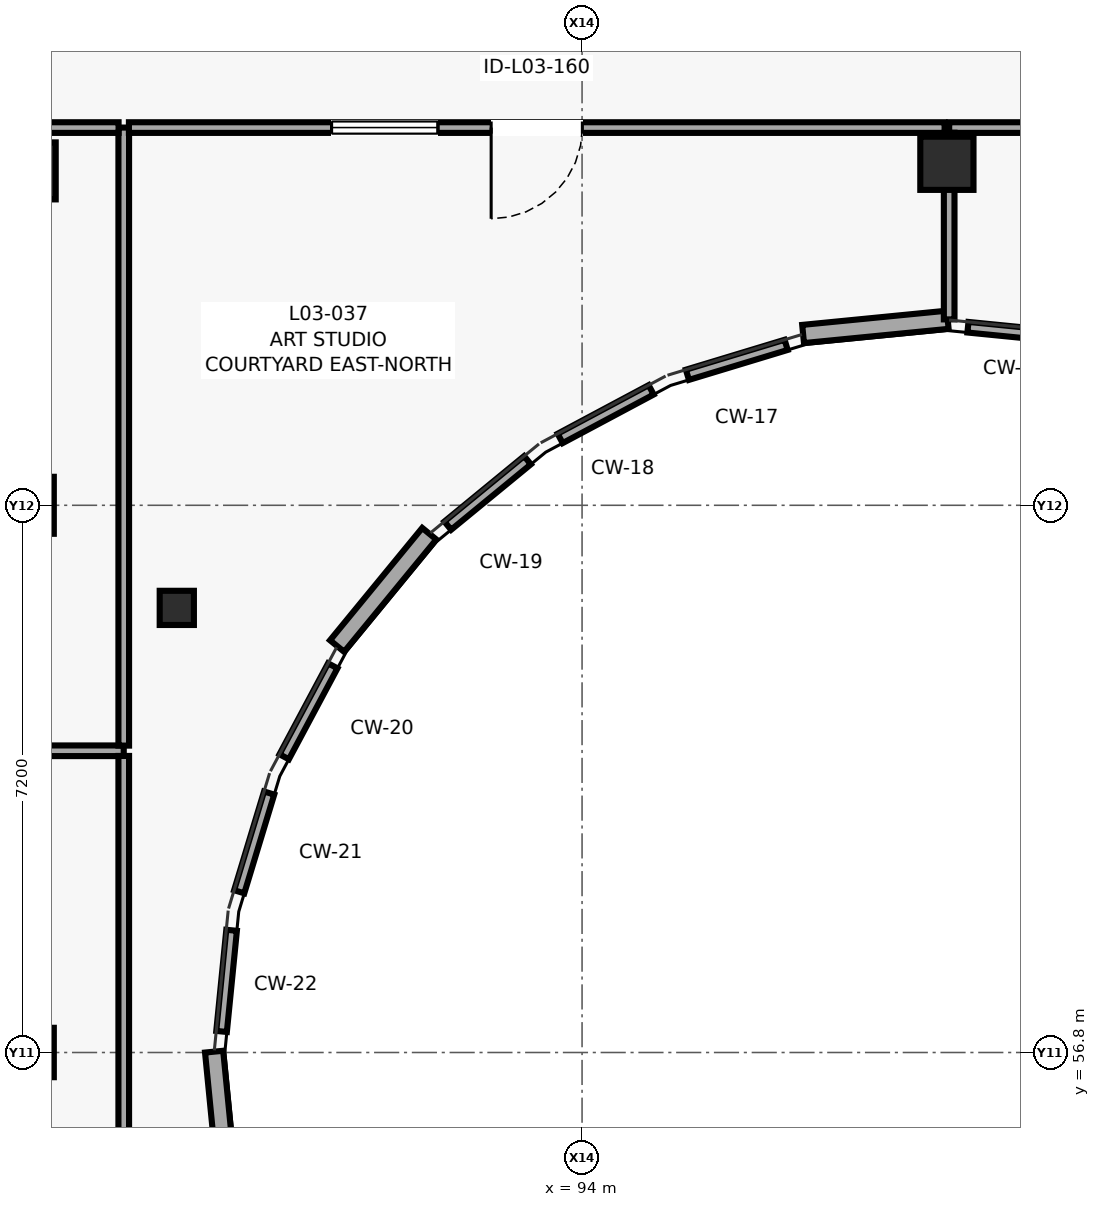
"""IFC4 building model, lengths in metres.
Left out: names, types, materials, properties, quantities, classifications, styles, units other than length and angle.
Written with IfcOpenShell. Run it as: python <this file> out.ifc"""

import sys

from ifc_helpers import new_model, si_unit, direction, frame, frame_2d, origin, origin_2d, place, context, subcontext, project, spatial, rectangle, circle, extrude, element, fill, save


model = new_model("IFC4")
c1 = context("Model", 3, precision=1e-05, world=origin(), true_north=direction((0.0, 1.0)))
c2 = subcontext(c1, "Body", "Model", "MODEL_VIEW")
j1 = project(units=[si_unit("LENGTHUNIT", "METRE"), si_unit("PLANEANGLEUNIT", "RADIAN")], contexts=[c1])
p1 = place(None, origin())
s1 = spatial("IfcSite", under=j1, at=p1, CompositionType="ELEMENT")
p2 = place(p1, origin())
s2 = spatial("IfcBuilding", under=s1, at=p2, CompositionType="ELEMENT")
p3 = place(p2, frame((0.0, 0.0, 12.2)))
s3 = spatial("IfcBuildingStorey", under=s2, at=p3, CompositionType="ELEMENT", Elevation=12.2)
p4 = place(p3, frame((86.8, 56.8, 0.0), z_axis=(0.0, 0.0, 1.0), x_axis=(1.0, 0.0, 0.0)))
e1 = element("IfcColumn", 1, at=p4, inside=s3, PredefinedType="COLUMN", context=c2, shape_type="SweptSolid", body=[
    extrude(rectangle(XDim=0.5, YDim=0.65, at=origin_2d()), origin(), (0.0, 0.0, 1.0), 4.0),
])
p5 = place(p3, frame((86.8, 64.0, 0.0), z_axis=(0.0, 0.0, 1.0), x_axis=(1.0, 0.0, 0.0)))
e2 = element("IfcColumn", 2, at=p5, inside=s3, PredefinedType="COLUMN", context=c2, shape_type="SweptSolid", body=[
    extrude(rectangle(XDim=0.5, YDim=0.75, at=origin_2d()), origin(), (0.0, 0.0, 1.0), 4.0),
])
p6 = place(p3, frame((86.8, 68.4, 0.0), z_axis=(0.0, 0.0, 1.0), x_axis=(1.0, 0.0, 0.0)))
e3 = element("IfcColumn", 3, at=p6, inside=s3, PredefinedType="COLUMN", context=c2, shape_type="SweptSolid", body=[
    extrude(rectangle(XDim=0.55, YDim=0.75, at=origin_2d()), origin(), (0.0, 0.0, 1.0), 4.0),
])
p7 = place(p3, frame((88.668, 62.65, 0.0), z_axis=(0.0, 0.0, 1.0), x_axis=(1.0, 0.0, 0.0)))
e4 = element("IfcColumn", 4, at=p7, inside=s3, PredefinedType="COLUMN", context=c2, shape_type="SweptSolid", body=[
    extrude(circle(Radius=0.225, at=origin_2d()), origin(), (0.0, 0.0, 1.0), 4.0),
])
p8 = place(p3, frame((98.8, 68.5, 0.0), z_axis=(0.0, 0.0, 1.0), x_axis=(1.0, 0.0, 0.0)))
e5 = element("IfcColumn", 5, at=p8, inside=s3, PredefinedType="COLUMN", context=c2, shape_type="SweptSolid", body=[
    extrude(circle(Radius=0.35, at=origin_2d()), origin(), (0.0, 0.0, 1.0), 4.0),
])
p9 = place(p3, frame((98.811, 66.441, 0.0), z_axis=(0.0, 0.0, 1.0), x_axis=(-0.995206378086, -0.097797060374, 0.0)))
e6 = element("IfcWall", 6, at=p9, inside=s3, PredefinedType="SOLIDWALL", context=c2, shape_type="SweptSolid", body=[
    extrude(rectangle(XDim=1.912, YDim=0.24, at=frame_2d((0.956, 0.0))), origin(), (0.0, 0.0, 1.0), 3.78),
])
p10 = place(p3, frame((91.99, 63.626, 0.0), z_axis=(0.0, 0.0, 1.0), x_axis=(-0.634363572305, -0.773034836299, 0.0)))
e7 = element("IfcWall", 7, at=p10, inside=s3, PredefinedType="SOLIDWALL", context=c2, shape_type="SweptSolid", body=[
    extrude(rectangle(XDim=1.912, YDim=0.24, at=frame_2d((0.956, 0.0))), origin(), (0.0, 0.0, 1.0), 3.78),
])
p11 = place(p3, frame((89.159, 56.811, 0.0), z_axis=(0.0, 0.0, 1.0), x_axis=(0.097797060374, -0.995206378086, 0.0)))
e8 = element("IfcWall", 8, at=p11, inside=s3, PredefinedType="SOLIDWALL", context=c2, shape_type="SweptSolid", body=[
    extrude(rectangle(XDim=1.912, YDim=0.24, at=frame_2d((0.956, 0.0))), origin(), (0.0, 0.0, 1.0), 3.78),
])
p12 = place(p3, frame((87.97, 60.77, 0.0), z_axis=(0.0, 0.0, 1.0), x_axis=(-1.0, 0.0, 0.0)))
e9 = element("IfcWall", 9, at=p12, inside=s3, PredefinedType="PARTITIONING", context=c2, shape_type="SweptSolid", body=[
    extrude(rectangle(XDim=8.44, YDim=0.14, at=frame_2d((4.22, 0.0))), origin(), (0.0, 0.0, 1.0), 3.755),
])
p13 = place(p3, frame((87.97, 52.83, 0.0), z_axis=(0.0, 0.0, 1.0), x_axis=(0.0, 1.0, 0.0)))
e10 = element("IfcWall", 10, at=p13, inside=s3, PredefinedType="PARTITIONING", context=c2, shape_type="SweptSolid", body=[
    extrude(rectangle(XDim=7.872, YDim=0.14, at=frame_2d((3.936, 0.0))), origin(), (0.0, 0.0, 1.0), 3.755),
])
p14 = place(p3, frame((87.97, 60.838, 0.0), z_axis=(0.0, 0.0, 1.0), x_axis=(0.0, 1.0, 0.0)))
e11 = element("IfcWall", 11, at=p14, inside=s3, PredefinedType="PARTITIONING", context=c2, shape_type="SweptSolid", body=[
    extrude(rectangle(XDim=8.132, YDim=0.14, at=frame_2d((4.066, 0.0))), origin(), (0.0, 0.0, 1.0), 3.755),
])
p15 = place(p3, frame((87.902, 68.97, 0.0), z_axis=(0.0, 0.0, 1.0), x_axis=(-1.0, 0.0, 0.0)))
e12 = element("IfcWall", 12, at=p15, inside=s3, PredefinedType="PARTITIONING", context=c2, shape_type="SweptSolid", body=[
    extrude(rectangle(XDim=8.372, YDim=0.14, at=frame_2d((4.186, 0.0))), origin(), (0.0, 0.0, 1.0), 3.755),
])
p16 = place(p3, frame((112.902, 68.97, 0.0), z_axis=(0.0, 0.0, 1.0), x_axis=(-1.0, 0.0, 0.0)))
e13 = element("IfcWall", 13, at=p16, inside=s3, PredefinedType="PARTITIONING", context=c2, shape_type="SweptSolid", body=[
    extrude(rectangle(XDim=14.072, YDim=0.14, at=frame_2d((7.036, 0.0))), origin(), (0.0, 0.0, 1.0), 3.755),
])
p17 = place(p16, frame((6.436, 0.0, 0.0)))
e14 = element("IfcOpeningElement", 14, at=p17, cuts=e13, PredefinedType="OPENING", context=c2, shape_type="SweptSolid", body=[
    extrude(rectangle(XDim=1.2, YDim=2.15, at=frame_2d((0.6, 1.075))), frame((0.0, 0.08, 0.0), z_axis=(0.0, -1.0, 0.0), x_axis=(1.0, 0.0, 0.0)), (0.0, 0.0, 1.0), 0.16),
])
p18 = place(p16, frame((8.336, 0.0, 1.05)))
e15 = element("IfcOpeningElement", 15, at=p18, cuts=e13, PredefinedType="OPENING", context=c2, shape_type="SweptSolid", body=[
    extrude(rectangle(XDim=1.6, YDim=1.1, at=frame_2d((0.8, 0.55))), frame((0.0, 0.08, 0.0), z_axis=(0.0, -1.0, 0.0), x_axis=(1.0, 0.0, 0.0)), (0.0, 0.0, 1.0), 0.16),
])
p19 = place(p3, frame((98.83, 68.902, 0.0), z_axis=(0.0, 0.0, 1.0), x_axis=(0.0, -1.0, 0.0)))
e16 = element("IfcWall", 16, at=p19, inside=s3, PredefinedType="PARTITIONING", context=c2, shape_type="SweptSolid", body=[
    extrude(rectangle(XDim=2.456, YDim=0.14, at=frame_2d((1.228, 0.0))), origin(), (0.0, 0.0, 1.0), 3.755),
])
p20 = place(p3, frame((99.077, 66.343, 0.0), z_axis=(0.0, 0.0, 1.0), x_axis=(0.995112801185, -0.098744685517, 0.0)))
e17 = element("IfcWall", 17, at=p20, inside=s3, PredefinedType="PARTITIONING", context=c2, shape_type="SweptSolid", body=[
    extrude(rectangle(XDim=1.338, YDim=0.14, at=frame_2d((0.669, 0.0))), origin(), (0.0, 0.0, 1.0), 3.755),
])
p21 = place(p3, frame((92.233, 63.732, 0.0), z_axis=(0.0, 0.0, 1.0), x_axis=(0.772962530207, 0.634451674201, 0.0)))
e18 = element("IfcWall", 18, at=p21, inside=s3, PredefinedType="PARTITIONING", context=c2, shape_type="SweptSolid", body=[
    extrude(rectangle(XDim=1.357, YDim=0.14, at=frame_2d((0.679, 0.0))), origin(), (0.0, 0.0, 1.0), 3.755),
])
p22 = place(p3, frame((93.712, 64.88, 0.0), z_axis=(0.0, 0.0, 1.0), x_axis=(0.882123740571, 0.471017734614, 0.0)))
e19 = element("IfcWall", 19, at=p22, inside=s3, PredefinedType="PARTITIONING", context=c2, shape_type="SweptSolid", body=[
    extrude(rectangle(XDim=1.357, YDim=0.14, at=frame_2d((0.678, 0.0))), origin(), (0.0, 0.0, 1.0), 3.755),
])
p23 = place(p3, frame((95.386, 65.717, 0.0), z_axis=(0.0, 0.0, 1.0), x_axis=(0.956945716193, 0.290266939661, 0.0)))
e20 = element("IfcWall", 20, at=p23, inside=s3, PredefinedType="PARTITIONING", context=c2, shape_type="SweptSolid", body=[
    extrude(rectangle(XDim=1.357, YDim=0.14, at=frame_2d((0.679, 0.0))), origin(), (0.0, 0.0, 1.0), 3.755),
])
p24 = place(p3, frame((98.77, 68.97, 0.0), z_axis=(0.0, 0.0, 1.0), x_axis=(-1.0, 0.0, 0.0)))
e21 = element("IfcWall", 21, at=p24, inside=s3, PredefinedType="PARTITIONING", context=c2, shape_type="SweptSolid", body=[
    extrude(rectangle(XDim=10.732, YDim=0.14, at=frame_2d((5.366, 0.0))), origin(), (0.0, 0.0, 1.0), 3.755),
])
p25 = place(p24, frame((4.766, 0.0, 0.0)))
e22 = element("IfcOpeningElement", 22, at=p25, cuts=e21, PredefinedType="OPENING", context=c2, shape_type="SweptSolid", body=[
    extrude(rectangle(XDim=1.2, YDim=2.15, at=frame_2d((0.6, 1.075))), frame((0.0, 0.08, 0.0), z_axis=(0.0, -1.0, 0.0), x_axis=(1.0, 0.0, 0.0)), (0.0, 0.0, 1.0), 0.16),
])
p26 = place(p24, frame((6.666, 0.0, 1.05)))
e23 = element("IfcOpeningElement", 23, at=p26, cuts=e21, PredefinedType="OPENING", context=c2, shape_type="SweptSolid", body=[
    extrude(rectangle(XDim=1.4, YDim=1.05, at=frame_2d((0.7, 0.525))), frame((0.0, 0.08, 0.0), z_axis=(0.0, -1.0, 0.0), x_axis=(1.0, 0.0, 0.0)), (0.0, 0.0, 1.0), 0.16),
])
p27 = place(p3, frame((89.257, 57.077, 0.0), z_axis=(0.0, 0.0, 1.0), x_axis=(0.098563937798, 0.99513072014, 0.0)))
e24 = element("IfcWall", 24, at=p27, inside=s3, PredefinedType="PARTITIONING", context=c2, shape_type="SweptSolid", body=[
    extrude(rectangle(XDim=1.338, YDim=0.14, at=frame_2d((0.669, 0.0))), origin(), (0.0, 0.0, 1.0), 3.755),
])
p28 = place(p3, frame((89.489, 58.915, 0.0), z_axis=(0.0, 0.0, 1.0), x_axis=(0.290266939661, 0.956945716193, 0.0)))
e25 = element("IfcWall", 25, at=p28, inside=s3, PredefinedType="PARTITIONING", context=c2, shape_type="SweptSolid", body=[
    extrude(rectangle(XDim=1.357, YDim=0.14, at=frame_2d((0.679, 0.0))), origin(), (0.0, 0.0, 1.0), 3.755),
])
p29 = place(p3, frame((90.081, 60.691, 0.0), z_axis=(0.0, 0.0, 1.0), x_axis=(0.470877717269, 0.882198489785, 0.0)))
e26 = element("IfcWall", 26, at=p29, inside=s3, PredefinedType="PARTITIONING", context=c2, shape_type="SweptSolid", body=[
    extrude(rectangle(XDim=1.357, YDim=0.14, at=frame_2d((0.678, 0.0))), origin(), (0.0, 0.0, 1.0), 3.755),
])
p30 = place(p25, origin())
e27 = element("IfcDoor", 27, at=p30, inside=s3, OperationType="SINGLE_SWING_RIGHT", PredefinedType="DOOR", context=c2, shape_type="SweptSolid", body=[
    extrude(rectangle(XDim=1.2, YDim=2.15, at=frame_2d((0.6, 1.075))), frame((0.0, 0.025, 0.0), z_axis=(0.0, -1.0, 0.0), x_axis=(1.0, 0.0, 0.0)), (0.0, 0.0, 1.0), 0.05),
])
fill(e22, e27)
p31 = place(p26, origin())
e28 = element("IfcWindow", 28, at=p31, inside=s3, PartitioningType="SINGLE_PANEL", PredefinedType="WINDOW", context=c2, shape_type="SweptSolid", body=[
    extrude(rectangle(XDim=1.4, YDim=1.05, at=frame_2d((0.7, 0.525))), frame((0.0, 0.03, 0.0), z_axis=(0.0, -1.0, 0.0), x_axis=(1.0, 0.0, 0.0)), (0.0, 0.0, 1.0), 0.06),
])
fill(e23, e28)
save(model, sys.argv[1])
